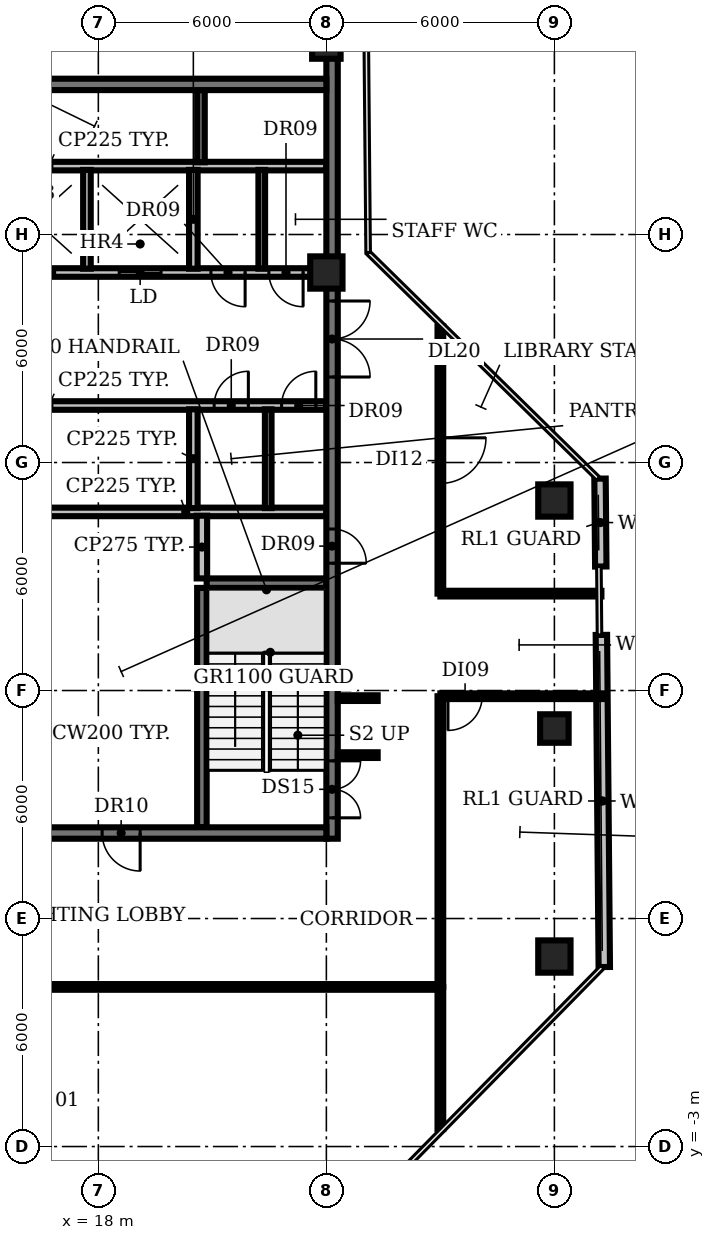
"""IFC4 building model, lengths in metres.
Left out: names, types, materials, properties, quantities, classifications, styles, units other than length and angle.
Written with IfcOpenShell. Run it as: python <this file> out.ifc"""

import sys

from ifc_helpers import new_model, si_unit, direction, frame, frame_2d, origin, origin_2d, place, context, subcontext, project, spatial, rectangle, circle, extrude, element, fill, save


model = new_model("IFC4")
c1 = context("Model", 3, precision=1e-05, world=origin(), true_north=direction((0.0, 1.0)))
c2 = subcontext(c1, "Body", "Model", "MODEL_VIEW")
j1 = project(units=[si_unit("LENGTHUNIT", "METRE"), si_unit("PLANEANGLEUNIT", "RADIAN")], contexts=[c1])
p1 = place(None, origin())
s1 = spatial("IfcSite", under=j1, at=p1, CompositionType="ELEMENT")
p2 = place(p1, origin())
s2 = spatial("IfcBuilding", under=s1, at=p2, CompositionType="ELEMENT")
p3 = place(p2, frame((0.0, 0.0, 289.4)))
s3 = spatial("IfcBuildingStorey", under=s2, at=p3, CompositionType="ELEMENT", Elevation=289.4)
p4 = place(p3, frame((24.0, 20.0, 0.0), z_axis=(0.0, 0.0, 1.0), x_axis=(1.0, 0.0, 0.0)))
e1 = element("IfcColumn", 1, at=p4, inside=s3, PredefinedType="COLUMN", context=c2, shape_type="SweptSolid", body=[
    extrude(circle(Radius=0.425, at=origin_2d()), origin(), (0.0, 0.0, 1.0), 3.85),
])
p5 = place(p3, frame((24.0, 26.0, 0.0), z_axis=(0.0, 0.0, 1.0), x_axis=(1.0, 0.0, 0.0)))
e2 = element("IfcColumn", 2, at=p5, inside=s3, PredefinedType="COLUMN", context=c2, shape_type="SweptSolid", body=[
    extrude(rectangle(XDim=0.75, YDim=0.75, at=origin_2d()), origin(), (0.0, 0.0, 1.0), 3.85),
])
p6 = place(p3, frame((30.0, 2.0, 0.0), z_axis=(0.0, 0.0, 1.0), x_axis=(1.0, 0.0, 0.0)))
e3 = element("IfcColumn", 3, at=p6, inside=s3, PredefinedType="COLUMN", context=c2, shape_type="SweptSolid", body=[
    extrude(circle(Radius=0.425, at=origin_2d()), origin(), (0.0, 0.0, 1.0), 3.85),
])
p7 = place(p3, frame((30.0, 8.0, 0.0), z_axis=(0.0, 0.0, 1.0), x_axis=(1.0, 0.0, 0.0)))
e4 = element("IfcColumn", 4, at=p7, inside=s3, PredefinedType="COLUMN", context=c2, shape_type="SweptSolid", body=[
    extrude(rectangle(XDim=0.75, YDim=0.75, at=origin_2d()), origin(), (0.0, 0.0, 1.0), 3.85),
])
p8 = place(p3, frame((30.0, 14.0, 0.0), z_axis=(0.0, 0.0, 1.0), x_axis=(1.0, 0.0, 0.0)))
e5 = element("IfcColumn", 5, at=p8, inside=s3, PredefinedType="COLUMN", context=c2, shape_type="SweptSolid", body=[
    extrude(circle(Radius=0.425, at=origin_2d()), origin(), (0.0, 0.0, 1.0), 3.85),
])
p9 = place(p3, frame((31.313, 1.724, 0.0), z_axis=(0.0, 0.0, 1.0), x_axis=(-0.008715239699, 0.999962021577, 0.0)))
e6 = element("IfcWall", 6, at=p9, inside=s3, PredefinedType="SOLIDWALL", context=c2, shape_type="SweptSolid", body=[
    extrude(rectangle(XDim=8.74, YDim=0.3, at=frame_2d((4.37, 0.0))), origin(), (0.0, 0.0, 1.0), 3.85),
])
p10 = place(p3, frame((31.221, 12.263, 0.0), z_axis=(0.0, 0.0, 1.0), x_axis=(-0.008654029484, 0.999962553186, 0.0)))
e7 = element("IfcWall", 7, at=p10, inside=s3, PredefinedType="SOLIDWALL", context=c2, shape_type="SweptSolid", body=[
    extrude(rectangle(XDim=2.313, YDim=0.3, at=frame_2d((1.157, 0.0))), origin(), (0.0, 0.0, 1.0), 3.85),
])
p11 = place(p3, frame((20.85, 11.825, 0.0), z_axis=(0.0, 0.0, 1.0), x_axis=(1.0, 0.0, 0.0)))
e8 = element("IfcWall", 8, at=p11, inside=s3, PredefinedType="SHEAR", context=c2, shape_type="SweptSolid", body=[
    extrude(rectangle(XDim=3.15, YDim=0.25, at=frame_2d((1.575, 0.0))), origin(), (0.0, 0.0, 1.0), 3.85),
])
p12 = place(p3, frame((16.6, 13.7, 0.0), z_axis=(0.0, 0.0, 1.0), x_axis=(1.0, 0.0, 0.0)))
e9 = element("IfcWall", 9, at=p12, inside=s3, PredefinedType="PARTITIONING", context=c2, shape_type="SweptSolid", body=[
    extrude(rectangle(XDim=7.4, YDim=0.225, at=frame_2d((3.7, 0.0))), origin(), (0.0, 0.0, 1.0), 3.85),
])
p13 = place(p3, frame((9.4, 16.5, 0.0), z_axis=(0.0, 0.0, 1.0), x_axis=(1.0, 0.0, 0.0)))
e10 = element("IfcWall", 10, at=p13, inside=s3, PredefinedType="PARTITIONING", context=c2, shape_type="SweptSolid", body=[
    extrude(rectangle(XDim=14.6, YDim=0.225, at=frame_2d((7.3, 0.0))), origin(), (0.0, 0.0, 1.0), 3.85),
])
p14 = place(p13, frame((0.55, 0.0, 0.0)))
e11 = element("IfcOpeningElement", 11, at=p14, cuts=e10, PredefinedType="OPENING", context=c2, shape_type="SweptSolid", body=[
    extrude(rectangle(XDim=0.9, YDim=2.1, at=frame_2d((0.45, 1.05))), frame((0.0, 0.123, 0.0), z_axis=(0.0, -1.0, 0.0), x_axis=(1.0, 0.0, 0.0)), (0.0, 0.0, 1.0), 0.245),
])
p15 = place(p13, frame((6.075, 0.0, 0.0)))
e12 = element("IfcOpeningElement", 12, at=p15, cuts=e10, PredefinedType="OPENING", context=c2, shape_type="SweptSolid", body=[
    extrude(rectangle(XDim=1.0, YDim=2.1, at=frame_2d((0.5, 1.05))), frame((0.0, 0.123, 0.0), z_axis=(0.0, -1.0, 0.0), x_axis=(1.0, 0.0, 0.0)), (0.0, 0.0, 1.0), 0.245),
])
p16 = place(p13, frame((11.647, 0.0, 0.0)))
e13 = element("IfcOpeningElement", 13, at=p16, cuts=e10, PredefinedType="OPENING", context=c2, shape_type="SweptSolid", body=[
    extrude(rectangle(XDim=0.9, YDim=2.1, at=frame_2d((0.45, 1.05))), frame((0.0, 0.123, 0.0), z_axis=(0.0, -1.0, 0.0), x_axis=(1.0, 0.0, 0.0)), (0.0, 0.0, 1.0), 0.245),
])
p17 = place(p13, frame((13.423, 0.0, 0.0)))
e14 = element("IfcOpeningElement", 14, at=p17, cuts=e10, PredefinedType="OPENING", context=c2, shape_type="SweptSolid", body=[
    extrude(rectangle(XDim=0.9, YDim=2.1, at=frame_2d((0.45, 1.05))), frame((0.0, 0.123, 0.0), z_axis=(0.0, -1.0, 0.0), x_axis=(1.0, 0.0, 0.0)), (0.0, 0.0, 1.0), 0.245),
])
p18 = place(p3, frame((24.0, 20.0, 0.0), z_axis=(0.0, 0.0, 1.0), x_axis=(-1.0, 0.0, 0.0)))
e15 = element("IfcWall", 15, at=p18, inside=s3, PredefinedType="PARTITIONING", context=c2, shape_type="SweptSolid", body=[
    extrude(rectangle(XDim=14.6, YDim=0.225, at=frame_2d((7.3, 0.0))), origin(), (0.0, 0.0, 1.0), 3.85),
])
p19 = place(p18, frame((12.75, 0.0, 0.0)))
e16 = element("IfcOpeningElement", 16, at=p19, cuts=e15, PredefinedType="OPENING", context=c2, shape_type="SweptSolid", body=[
    extrude(rectangle(XDim=1.1, YDim=2.1, at=frame_2d((0.55, 1.05))), frame((0.0, 0.123, 0.0), z_axis=(0.0, -1.0, 0.0), x_axis=(1.0, 0.0, 0.0)), (0.0, 0.0, 1.0), 0.245),
])
p20 = place(p18, frame((9.95, 0.0, 0.0)))
e17 = element("IfcOpeningElement", 17, at=p20, cuts=e15, PredefinedType="OPENING", context=c2, shape_type="SweptSolid", body=[
    extrude(rectangle(XDim=1.1, YDim=2.1, at=frame_2d((0.55, 1.05))), frame((0.0, 0.123, 0.0), z_axis=(0.0, -1.0, 0.0), x_axis=(1.0, 0.0, 0.0)), (0.0, 0.0, 1.0), 0.245),
])
p21 = place(p18, frame((7.15, 0.0, 0.0)))
e18 = element("IfcOpeningElement", 18, at=p21, cuts=e15, PredefinedType="OPENING", context=c2, shape_type="SweptSolid", body=[
    extrude(rectangle(XDim=1.1, YDim=2.1, at=frame_2d((0.55, 1.05))), frame((0.0, 0.123, 0.0), z_axis=(0.0, -1.0, 0.0), x_axis=(1.0, 0.0, 0.0)), (0.0, 0.0, 1.0), 0.245),
])
p22 = place(p18, frame((4.35, 0.0, 0.0)))
e19 = element("IfcOpeningElement", 19, at=p22, cuts=e15, PredefinedType="OPENING", context=c2, shape_type="SweptSolid", body=[
    extrude(rectangle(XDim=1.1, YDim=2.1, at=frame_2d((0.55, 1.05))), frame((0.0, 0.123, 0.0), z_axis=(0.0, -1.0, 0.0), x_axis=(1.0, 0.0, 0.0)), (0.0, 0.0, 1.0), 0.245),
])
p23 = place(p18, frame((2.137, 0.0, 0.0)))
e20 = element("IfcOpeningElement", 20, at=p23, cuts=e15, PredefinedType="OPENING", context=c2, shape_type="SweptSolid", body=[
    extrude(rectangle(XDim=0.9, YDim=2.1, at=frame_2d((0.45, 1.05))), frame((0.0, 0.123, 0.0), z_axis=(0.0, -1.0, 0.0), x_axis=(1.0, 0.0, 0.0)), (0.0, 0.0, 1.0), 0.245),
])
p24 = place(p18, frame((0.612, 0.0, 0.0)))
e21 = element("IfcOpeningElement", 21, at=p24, cuts=e15, PredefinedType="OPENING", context=c2, shape_type="SweptSolid", body=[
    extrude(rectangle(XDim=0.9, YDim=2.1, at=frame_2d((0.45, 1.05))), frame((0.0, 0.123, 0.0), z_axis=(0.0, -1.0, 0.0), x_axis=(1.0, 0.0, 0.0)), (0.0, 0.0, 1.0), 0.245),
])
p25 = place(p3, frame((9.4, 22.8, 0.0), z_axis=(0.0, 0.0, 1.0), x_axis=(1.0, 0.0, 0.0)))
e22 = element("IfcWall", 22, at=p25, inside=s3, PredefinedType="PARTITIONING", context=c2, shape_type="SweptSolid", body=[
    extrude(rectangle(XDim=14.6, YDim=0.225, at=frame_2d((7.3, 0.0))), origin(), (0.0, 0.0, 1.0), 3.85),
])
p26 = place(p3, frame((17.7, 20.1, 0.0), z_axis=(0.0, 0.0, 1.0), x_axis=(0.0, 1.0, 0.0)))
e23 = element("IfcWall", 23, at=p26, inside=s3, PredefinedType="SOLIDWALL", context=c2, shape_type="SweptSolid", body=[
    extrude(rectangle(XDim=2.6, YDim=0.2, at=frame_2d((1.3, 0.0))), origin(), (0.0, 0.0, 1.0), 3.85),
])
for number, where, z_axis, x_axis in (
    (24, (20.5, 13.8, 0.0), (0.0, 0.0, 1.0), (0.0, 1.0, 0.0)),
    (25, (20.5, 20.1, 0.0), (0.0, 0.0, 1.0), (0.0, 1.0, 0.0)),
):
    element("IfcWall", number, at=place(p3, frame(where, z_axis=z_axis, x_axis=x_axis)), inside=s3, PredefinedType="PARTITIONING", context=c2, shape_type="SweptSolid", body=[
        extrude(rectangle(XDim=2.6, YDim=0.225, at=frame_2d((1.3, 0.0))), origin(), (0.0, 0.0, 1.0), 3.85),
    ])
p27 = place(p3, frame((20.7, 22.9, 0.0), z_axis=(0.0, 0.0, 1.0), x_axis=(0.0, 1.0, 0.0)))
e26 = element("IfcWall", 26, at=p27, inside=s3, PredefinedType="SHEAR", context=c2, shape_type="SweptSolid", body=[
    extrude(rectangle(XDim=1.9, YDim=0.2, at=frame_2d((0.95, 0.0))), origin(), (0.0, 0.0, 1.0), 3.85),
])
p28 = place(p3, frame((20.725, 5.4, 0.0), z_axis=(0.0, 0.0, 1.0), x_axis=(0.0, 1.0, 0.0)))
e27 = element("IfcWall", 27, at=p28, inside=s3, PredefinedType="SHEAR", context=c2, shape_type="SweptSolid", body=[
    extrude(rectangle(XDim=6.3, YDim=0.25, at=frame_2d((3.15, 0.0))), origin(), (0.0, 0.0, 1.0), 3.85),
])
p29 = place(p3, frame((20.725, 11.95, 0.0), z_axis=(0.0, 0.0, 1.0), x_axis=(0.0, 1.0, 0.0)))
e28 = element("IfcWall", 28, at=p29, inside=s3, PredefinedType="PARTITIONING", context=c2, shape_type="SweptSolid", body=[
    extrude(rectangle(XDim=1.65, YDim=0.275, at=frame_2d((0.825, 0.0))), origin(), (0.0, 0.0, 1.0), 3.85),
])
for number, where, z_axis, x_axis in (
    (29, (22.3, 20.1, 0.0), (0.0, 0.0, 1.0), (0.0, 1.0, 0.0)),
    (30, (22.47, 13.8, 0.0), (0.0, 0.0, 1.0), (0.0, 1.0, 0.0)),
):
    element("IfcWall", number, at=place(p3, frame(where, z_axis=z_axis, x_axis=x_axis)), inside=s3, PredefinedType="PARTITIONING", context=c2, shape_type="SweptSolid", body=[
        extrude(rectangle(XDim=2.6, YDim=0.175, at=frame_2d((1.3, 0.0))), origin(), (0.0, 0.0, 1.0), 3.85),
    ])
p30 = place(p3, frame((24.15, 25.655, 0.0), z_axis=(0.0, 0.0, 1.0), x_axis=(0.0, -1.0, 0.0)))
e31 = element("IfcWall", 31, at=p30, inside=s3, PredefinedType="SHEAR", context=c2, shape_type="SweptSolid", body=[
    extrude(rectangle(XDim=20.555, YDim=0.3, at=frame_2d((10.277, 0.0))), origin(), (0.0, 0.0, 1.0), 3.85),
])
p31 = place(p30, frame((18.505, 0.0, 0.0)))
e32 = element("IfcOpeningElement", 32, at=p31, cuts=e31, PredefinedType="OPENING", context=c2, shape_type="SweptSolid", body=[
    extrude(rectangle(XDim=1.5, YDim=2.1, at=frame_2d((0.75, 1.05))), frame((0.0, 0.16, 0.0), z_axis=(0.0, -1.0, 0.0), x_axis=(1.0, 0.0, 0.0)), (0.0, 0.0, 1.0), 0.32),
])
p32 = place(p30, frame((12.405, 0.0, 0.0)))
e33 = element("IfcOpeningElement", 33, at=p32, cuts=e31, PredefinedType="OPENING", context=c2, shape_type="SweptSolid", body=[
    extrude(rectangle(XDim=0.9, YDim=2.1, at=frame_2d((0.45, 1.05))), frame((0.0, 0.16, 0.0), z_axis=(0.0, -1.0, 0.0), x_axis=(1.0, 0.0, 0.0)), (0.0, 0.0, 1.0), 0.32),
])
p33 = place(p30, frame((6.405, 0.0, 0.0)))
e34 = element("IfcOpeningElement", 34, at=p33, cuts=e31, PredefinedType="OPENING", context=c2, shape_type="SweptSolid", body=[
    extrude(rectangle(XDim=2.0, YDim=2.1, at=frame_2d((1.0, 1.05))), frame((0.0, 0.16, 0.0), z_axis=(0.0, -1.0, 0.0), x_axis=(1.0, 0.0, 0.0)), (0.0, 0.0, 1.0), 0.32),
])
p34 = place(p3, frame((24.0, 5.25, 0.0), z_axis=(0.0, 0.0, 1.0), x_axis=(-1.0, 0.0, 0.0)))
e35 = element("IfcWall", 35, at=p34, inside=s3, PredefinedType="SHEAR", context=c2, shape_type="SweptSolid", body=[
    extrude(rectangle(XDim=18.0, YDim=0.3, at=frame_2d((9.0, 0.0))), origin(), (0.0, 0.0, 1.0), 3.85),
])
p35 = place(p34, frame((13.0, 0.0, 0.0)))
e36 = element("IfcOpeningElement", 36, at=p35, cuts=e35, PredefinedType="OPENING", context=c2, shape_type="SweptSolid", body=[
    extrude(rectangle(XDim=1.2, YDim=2.1, at=frame_2d((0.6, 1.05))), frame((0.0, 0.16, 0.0), z_axis=(0.0, -1.0, 0.0), x_axis=(1.0, 0.0, 0.0)), (0.0, 0.0, 1.0), 0.32),
])
p36 = place(p34, frame((4.9, 0.0, 0.0)))
e37 = element("IfcOpeningElement", 37, at=p36, cuts=e35, PredefinedType="OPENING", context=c2, shape_type="SweptSolid", body=[
    extrude(rectangle(XDim=1.0, YDim=2.1, at=frame_2d((0.5, 1.05))), frame((0.0, 0.16, 0.0), z_axis=(0.0, -1.0, 0.0), x_axis=(1.0, 0.0, 0.0)), (0.0, 0.0, 1.0), 0.32),
])
p37 = place(p3, frame((6.0, 24.95, 0.0), z_axis=(0.0, 0.0, 1.0), x_axis=(1.0, 0.0, 0.0)))
e38 = element("IfcWall", 38, at=p37, inside=s3, PredefinedType="SHEAR", context=c2, shape_type="SweptSolid", body=[
    extrude(rectangle(XDim=18.0, YDim=0.3, at=frame_2d((9.0, 0.0))), origin(), (0.0, 0.0, 1.0), 3.85),
])
for number, where, z_axis, x_axis in (
    (39, (24.3, 7.3, 0.0), (0.0, 0.0, 1.0), (1.0, 0.0, 0.0)),
    (40, (24.3, 8.8, 0.0), (0.0, 0.0, 1.0), (1.0, 0.0, 0.0)),
):
    element("IfcWall", number, at=place(p3, frame(where, z_axis=z_axis, x_axis=x_axis)), inside=s3, PredefinedType="PARTITIONING", context=c2, shape_type="SweptSolid", body=[
        extrude(rectangle(XDim=1.05, YDim=0.15, at=frame_2d((0.525, 0.0))), origin(), (0.0, 0.0, 1.0), 2.9),
    ])
p38 = place(p3, frame((27.0, -2.54, 0.0), z_axis=(0.0, 0.0, 1.0), x_axis=(0.0, 1.0, 0.0)))
e41 = element("IfcWall", 41, at=p38, inside=s3, PredefinedType="PARTITIONING", context=c2, shape_type="SweptSolid", body=[
    extrude(rectangle(XDim=3.74, YDim=0.15, at=frame_2d((1.87, 0.0))), origin(), (0.0, 0.0, 1.0), 2.9),
])
p39 = place(p3, frame((27.0, 1.2, 0.0), z_axis=(0.0, 0.0, 1.0), x_axis=(-1.0, 0.0, 0.0)))
e42 = element("IfcWall", 42, at=p39, inside=s3, PredefinedType="PARTITIONING", context=c2, shape_type="SweptSolid", body=[
    extrude(rectangle(XDim=24.0, YDim=0.15, at=frame_2d((12.0, 0.0))), origin(), (0.0, 0.0, 1.0), 2.9),
])
p40 = place(p39, frame((11.5, 0.0, 0.0)))
e43 = element("IfcOpeningElement", 43, at=p40, cuts=e42, PredefinedType="OPENING", context=c2, shape_type="SweptSolid", body=[
    extrude(rectangle(XDim=1.2, YDim=2.1, at=frame_2d((0.6, 1.05))), frame((0.0, 0.085, 0.0), z_axis=(0.0, -1.0, 0.0), x_axis=(1.0, 0.0, 0.0)), (0.0, 0.0, 1.0), 0.17),
])
p41 = place(p3, frame((27.0, 1.2, 0.0), z_axis=(0.0, 0.0, 1.0), x_axis=(0.0, 1.0, 0.0)))
e44 = element("IfcWall", 44, at=p41, inside=s3, PredefinedType="PARTITIONING", context=c2, shape_type="SweptSolid", body=[
    extrude(rectangle(XDim=7.65, YDim=0.15, at=frame_2d((3.825, 0.0))), origin(), (0.0, 0.0, 1.0), 2.9),
])
p42 = place(p3, frame((27.0, 11.55, 0.0), z_axis=(0.0, 0.0, 1.0), x_axis=(1.0, 0.0, 0.0)))
e45 = element("IfcWall", 45, at=p42, inside=s3, PredefinedType="PARTITIONING", context=c2, shape_type="SweptSolid", body=[
    extrude(rectangle(XDim=4.238, YDim=0.15, at=frame_2d((2.119, 0.0))), origin(), (0.0, 0.0, 1.0), 2.9),
])
p43 = place(p3, frame((27.0, 18.58, 0.0), z_axis=(0.0, 0.0, 1.0), x_axis=(0.0, -1.0, 0.0)))
e46 = element("IfcWall", 46, at=p43, inside=s3, PredefinedType="PARTITIONING", context=c2, shape_type="SweptSolid", body=[
    extrude(rectangle(XDim=7.03, YDim=0.15, at=frame_2d((3.515, 0.0))), origin(), (0.0, 0.0, 1.0), 2.9),
])
p44 = place(p43, frame((2.93, 0.0, 0.0)))
e47 = element("IfcOpeningElement", 47, at=p44, cuts=e46, PredefinedType="OPENING", context=c2, shape_type="SweptSolid", body=[
    extrude(rectangle(XDim=1.2, YDim=2.1, at=frame_2d((0.6, 1.05))), frame((0.0, 0.085, 0.0), z_axis=(0.0, -1.0, 0.0), x_axis=(1.0, 0.0, 0.0)), (0.0, 0.0, 1.0), 0.17),
])
p45 = place(p3, frame((31.261, 8.85, 0.0), z_axis=(0.0, 0.0, 1.0), x_axis=(-1.0, 0.0, 0.0)))
e48 = element("IfcWall", 48, at=p45, inside=s3, PredefinedType="PARTITIONING", context=c2, shape_type="SweptSolid", body=[
    extrude(rectangle(XDim=4.261, YDim=0.15, at=frame_2d((2.131, 0.0))), origin(), (0.0, 0.0, 1.0), 2.9),
])
p46 = place(p45, frame((3.161, 0.0, 0.0)))
e49 = element("IfcOpeningElement", 49, at=p46, cuts=e48, PredefinedType="OPENING", context=c2, shape_type="SweptSolid", body=[
    extrude(rectangle(XDim=0.9, YDim=2.1, at=frame_2d((0.45, 1.05))), frame((0.0, 0.085, 0.0), z_axis=(0.0, -1.0, 0.0), x_axis=(1.0, 0.0, 0.0)), (0.0, 0.0, 1.0), 0.17),
])
p47 = place(p16, origin())
e50 = element("IfcDoor", 50, at=p47, inside=s3, OperationType="SINGLE_SWING_RIGHT", PredefinedType="DOOR", context=c2, shape_type="SweptSolid", body=[
    extrude(rectangle(XDim=0.9, YDim=2.1, at=frame_2d((0.45, 1.05))), frame((0.0, 0.025, 0.0), z_axis=(0.0, -1.0, 0.0), x_axis=(1.0, 0.0, 0.0)), (0.0, 0.0, 1.0), 0.05),
])
fill(e13, e50)
p48 = place(p17, origin())
e51 = element("IfcDoor", 51, at=p48, inside=s3, OperationType="SINGLE_SWING_RIGHT", PredefinedType="DOOR", context=c2, shape_type="SweptSolid", body=[
    extrude(rectangle(XDim=0.9, YDim=2.1, at=frame_2d((0.45, 1.05))), frame((0.0, 0.025, 0.0), z_axis=(0.0, -1.0, 0.0), x_axis=(1.0, 0.0, 0.0)), (0.0, 0.0, 1.0), 0.05),
])
fill(e14, e51)
p49 = place(p21, origin())
e52 = element("IfcDoor", 52, at=p49, inside=s3, OperationType="DOUBLE_DOOR_SLIDING", PredefinedType="DOOR", context=c2, shape_type="SweptSolid", body=[
    extrude(rectangle(XDim=1.1, YDim=2.1, at=frame_2d((0.55, 1.05))), frame((0.0, 0.025, 0.0), z_axis=(0.0, -1.0, 0.0), x_axis=(1.0, 0.0, 0.0)), (0.0, 0.0, 1.0), 0.05),
])
fill(e18, e52)
p50 = place(p22, origin())
e53 = element("IfcDoor", 53, at=p50, inside=s3, OperationType="DOUBLE_DOOR_SLIDING", PredefinedType="DOOR", context=c2, shape_type="SweptSolid", body=[
    extrude(rectangle(XDim=1.1, YDim=2.1, at=frame_2d((0.55, 1.05))), frame((0.0, 0.025, 0.0), z_axis=(0.0, -1.0, 0.0), x_axis=(1.0, 0.0, 0.0)), (0.0, 0.0, 1.0), 0.05),
])
fill(e19, e53)
p51 = place(p23, origin())
e54 = element("IfcDoor", 54, at=p51, inside=s3, OperationType="SINGLE_SWING_LEFT", PredefinedType="DOOR", context=c2, shape_type="SweptSolid", body=[
    extrude(rectangle(XDim=0.9, YDim=2.1, at=frame_2d((0.45, 1.05))), frame((0.0, 0.025, 0.0), z_axis=(0.0, -1.0, 0.0), x_axis=(1.0, 0.0, 0.0)), (0.0, 0.0, 1.0), 0.05),
])
fill(e20, e54)
p52 = place(p24, origin())
e55 = element("IfcDoor", 55, at=p52, inside=s3, OperationType="SINGLE_SWING_LEFT", PredefinedType="DOOR", context=c2, shape_type="SweptSolid", body=[
    extrude(rectangle(XDim=0.9, YDim=2.1, at=frame_2d((0.45, 1.05))), frame((0.0, 0.025, 0.0), z_axis=(0.0, -1.0, 0.0), x_axis=(1.0, 0.0, 0.0)), (0.0, 0.0, 1.0), 0.05),
])
fill(e21, e55)
p53 = place(p31, origin())
e56 = element("IfcDoor", 56, at=p53, inside=s3, OperationType="DOUBLE_DOOR_SINGLE_SWING", PredefinedType="DOOR", context=c2, shape_type="SweptSolid", body=[
    extrude(rectangle(XDim=1.5, YDim=2.1, at=frame_2d((0.75, 1.05))), frame((0.0, 0.025, 0.0), z_axis=(0.0, -1.0, 0.0), x_axis=(1.0, 0.0, 0.0)), (0.0, 0.0, 1.0), 0.05),
])
fill(e32, e56)
p54 = place(p32, origin())
e57 = element("IfcDoor", 57, at=p54, inside=s3, OperationType="SINGLE_SWING_RIGHT", PredefinedType="DOOR", context=c2, shape_type="SweptSolid", body=[
    extrude(rectangle(XDim=0.9, YDim=2.1, at=frame_2d((0.45, 1.05))), frame((0.0, 0.025, 0.0), z_axis=(0.0, -1.0, 0.0), x_axis=(1.0, 0.0, 0.0)), (0.0, 0.0, 1.0), 0.05),
])
fill(e33, e57)
p55 = place(p33, origin())
e58 = element("IfcDoor", 58, at=p55, inside=s3, OperationType="DOUBLE_DOOR_SINGLE_SWING", PredefinedType="DOOR", context=c2, shape_type="SweptSolid", body=[
    extrude(rectangle(XDim=2.0, YDim=2.1, at=frame_2d((1.0, 1.05))), frame((0.0, 0.025, 0.0), z_axis=(0.0, -1.0, 0.0), x_axis=(1.0, 0.0, 0.0)), (0.0, 0.0, 1.0), 0.05),
])
fill(e34, e58)
p56 = place(p36, origin())
e59 = element("IfcDoor", 59, at=p56, inside=s3, OperationType="SINGLE_SWING_LEFT", PredefinedType="DOOR", context=c2, shape_type="SweptSolid", body=[
    extrude(rectangle(XDim=1.0, YDim=2.1, at=frame_2d((0.5, 1.05))), frame((0.0, 0.025, 0.0), z_axis=(0.0, -1.0, 0.0), x_axis=(1.0, 0.0, 0.0)), (0.0, 0.0, 1.0), 0.05),
])
fill(e37, e59)
p57 = place(p44, origin())
e60 = element("IfcDoor", 60, at=p57, inside=s3, OperationType="SINGLE_SWING_LEFT", PredefinedType="DOOR", context=c2, shape_type="SweptSolid", body=[
    extrude(rectangle(XDim=1.2, YDim=2.1, at=frame_2d((0.6, 1.05))), frame((0.0, 0.025, 0.0), z_axis=(0.0, -1.0, 0.0), x_axis=(1.0, 0.0, 0.0)), (0.0, 0.0, 1.0), 0.05),
])
fill(e47, e60)
p58 = place(p46, origin())
e61 = element("IfcDoor", 61, at=p58, inside=s3, OperationType="SINGLE_SWING_RIGHT", PredefinedType="DOOR", context=c2, shape_type="SweptSolid", body=[
    extrude(rectangle(XDim=0.9, YDim=2.1, at=frame_2d((0.45, 1.05))), frame((0.0, 0.025, 0.0), z_axis=(0.0, -1.0, 0.0), x_axis=(1.0, 0.0, 0.0)), (0.0, 0.0, 1.0), 0.05),
])
fill(e49, e61)
save(model, sys.argv[1])
